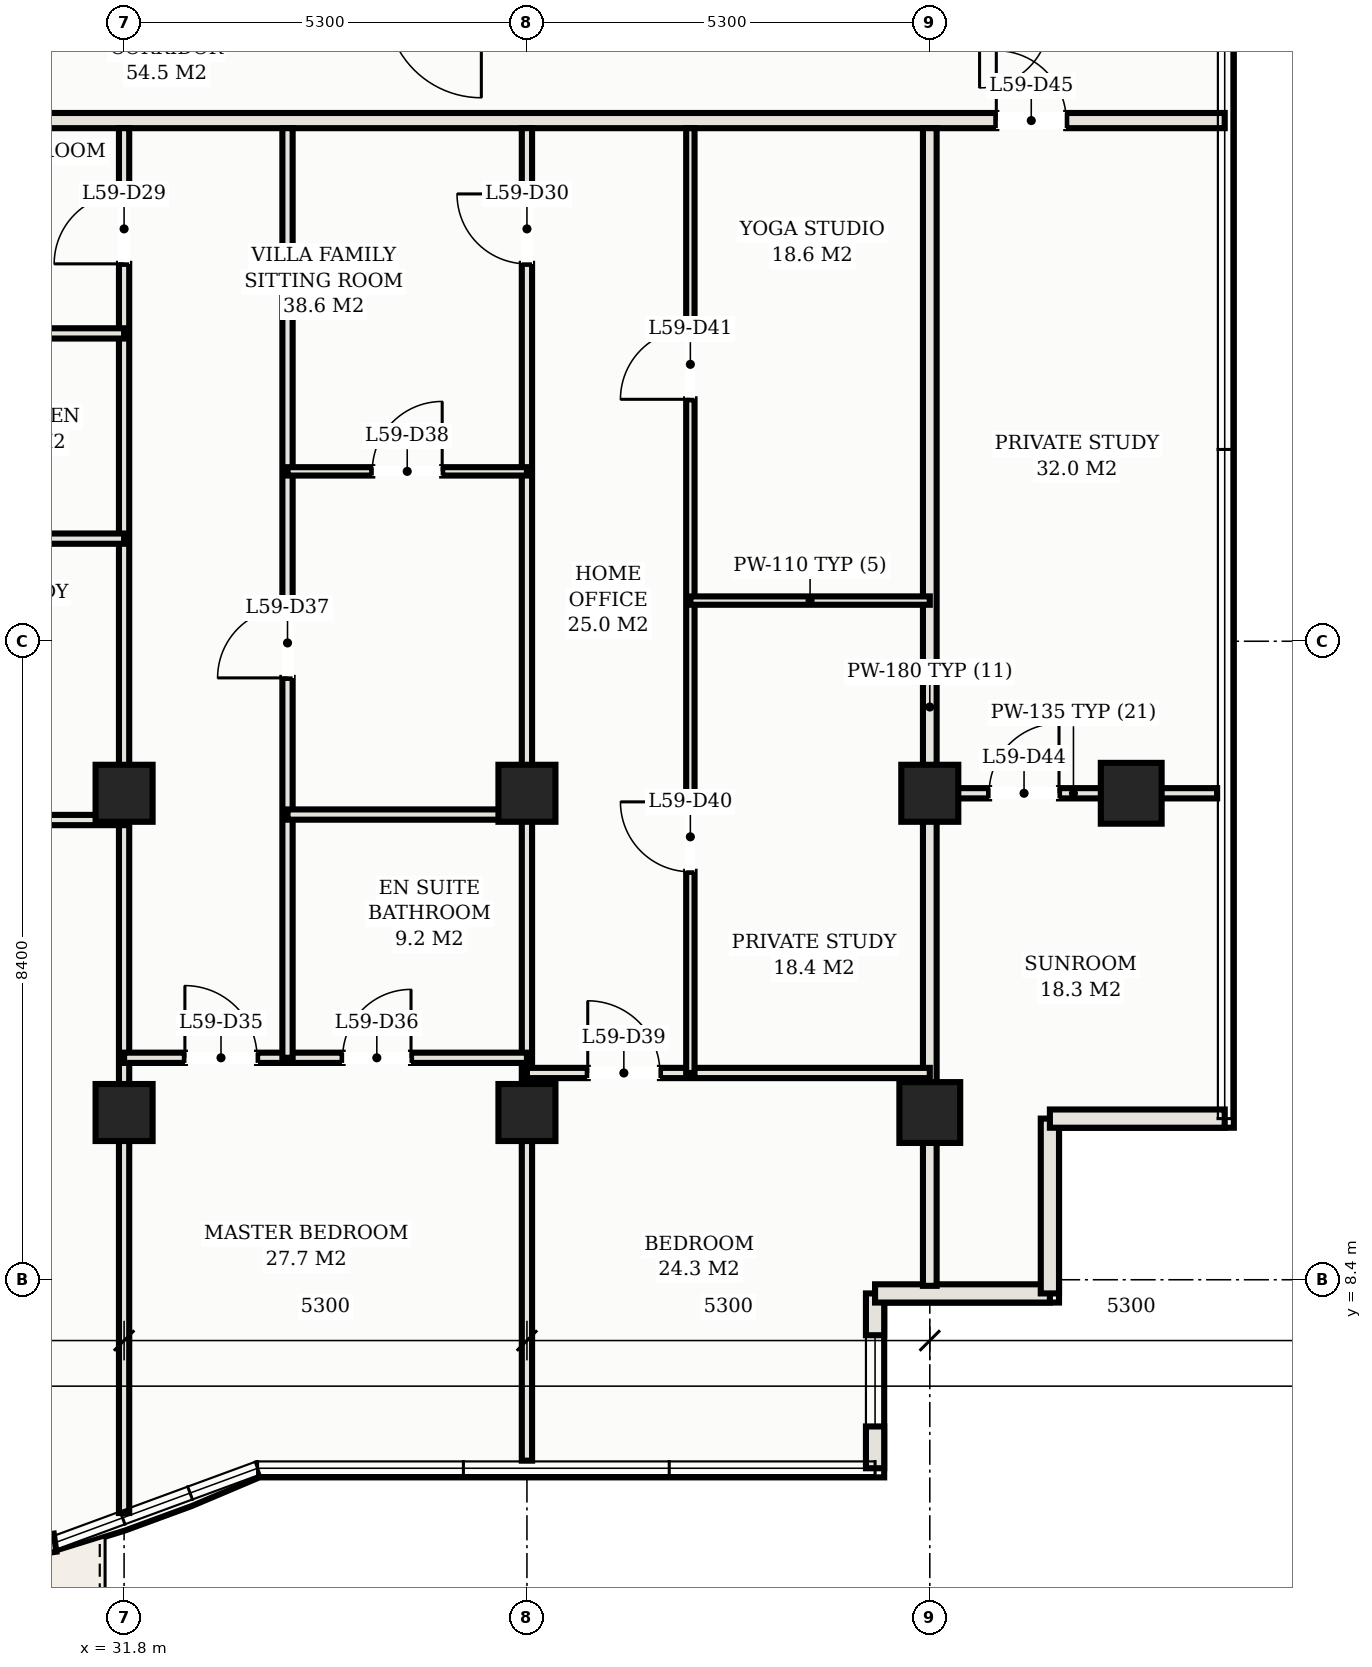
"""IFC4 building model, lengths in metres.
Left out: names, types, materials, properties, quantities, classifications, styles, units other than length and angle.
Written with IfcOpenShell. Run it as: python <this file> out.ifc"""

import sys

from ifc_helpers import new_model, si_unit, direction, frame, frame_2d, origin, origin_2d, place, context, subcontext, project, spatial, rectangle, hollow_rectangle, extrude, element, fill, save


model = new_model("IFC4")
c1 = context("Model", 3, precision=1e-05, world=origin(), true_north=direction((0.0, 1.0)))
c2 = subcontext(c1, "Body", "Model", "MODEL_VIEW")
j1 = project(units=[si_unit("LENGTHUNIT", "METRE"), si_unit("PLANEANGLEUNIT", "RADIAN")], contexts=[c1])
p1 = place(None, origin())
s1 = spatial("IfcSite", under=j1, at=p1, CompositionType="ELEMENT")
p2 = place(p1, origin())
s2 = spatial("IfcBuilding", under=s1, at=p2, CompositionType="ELEMENT")
p3 = place(p2, frame((0.0, 0.0, 216.5)))
s3 = spatial("IfcBuildingStorey", under=s2, at=p3, CompositionType="ELEMENT", Elevation=216.5)
for number, where, z_axis, x_axis in (
    (1, (31.8, 14.8, 0.0), (0.0, 0.0, 1.0), (1.0, 0.0, 0.0)),
    (2, (31.8, 10.6, 0.0), (0.0, 0.0, 1.0), (1.0, 0.0, 0.0)),
    (3, (37.1, 14.8, 0.0), (0.0, 0.0, 1.0), (1.0, 0.0, 0.0)),
    (4, (37.1, 10.6, 0.0), (0.0, 0.0, 1.0), (1.0, 0.0, 0.0)),
    (5, (42.4, 14.8, 0.0), (0.0, 0.0, 1.0), (1.0, 0.0, 0.0)),
):
    element("IfcColumn", number, at=place(p3, frame(where, z_axis=z_axis, x_axis=x_axis)), inside=s3, PredefinedType="COLUMN", context=c2, shape_type="SweptSolid", body=[
        extrude(hollow_rectangle(XDim=0.75, YDim=0.75, WallThickness=0.025, at=origin_2d()), origin(), (0.0, 0.0, 1.0), 3.3),
    ])
for number, where, z_axis, x_axis in (
    (6, (42.4, 10.6, 0.0), (0.0, 0.0, 1.0), (1.0, 0.0, 0.0)),
    (7, (45.05, 14.8, 0.0), (0.0, 0.0, 1.0), (1.0, 0.0, 0.0)),
):
    element("IfcColumn", number, at=place(p3, frame(where, z_axis=z_axis, x_axis=x_axis)), inside=s3, PredefinedType="COLUMN", context=c2, shape_type="SweptSolid", body=[
        extrude(hollow_rectangle(XDim=0.8, YDim=0.8, WallThickness=0.028, at=origin_2d()), origin(), (0.0, 0.0, 1.0), 3.3),
    ])
p4 = place(p3, frame((26.5, 4.32, 0.0), z_axis=(0.0, 0.0, 1.0), x_axis=(0.990156470874, 0.139964864115, 0.0)))
e8 = element("IfcWall", 8, at=p4, inside=s3, PredefinedType="SOLIDWALL", context=c2, shape_type="SweptSolid", body=[
    extrude(rectangle(XDim=4.436, YDim=0.24, at=frame_2d((2.218, 0.0))), origin(), (0.0, 0.0, 1.0), 3.11),
])
p5 = place(p4, frame((1.318, 0.0, 0.0)))
e9 = element("IfcOpeningElement", 9, at=p5, cuts=e8, PredefinedType="OPENING", context=c2, shape_type="SweptSolid", body=[
    extrude(rectangle(XDim=1.8, YDim=2.2, at=frame_2d((0.9, 1.1))), frame((0.0, 0.13, 0.0), z_axis=(0.0, -1.0, 0.0), x_axis=(1.0, 0.0, 0.0)), (0.0, 0.0, 1.0), 0.26),
])
p6 = place(p3, frame((41.68, 5.92, 0.0), z_axis=(0.0, 0.0, 1.0), x_axis=(0.0, 1.0, 0.0)))
e10 = element("IfcWall", 10, at=p6, inside=s3, PredefinedType="SOLIDWALL", context=c2, shape_type="SweptSolid", body=[
    extrude(rectangle(XDim=2.3, YDim=0.24, at=frame_2d((1.15, 0.0))), origin(), (0.0, 0.0, 1.0), 3.11),
])
p7 = place(p6, frame((0.55, 0.0, 0.75)))
e11 = element("IfcOpeningElement", 11, at=p7, cuts=e10, PredefinedType="OPENING", context=c2, shape_type="SweptSolid", body=[
    extrude(rectangle(XDim=1.2, YDim=1.5, at=frame_2d((0.6, 0.75))), frame((0.0, 0.13, 0.0), z_axis=(0.0, -1.0, 0.0), x_axis=(1.0, 0.0, 0.0)), (0.0, 0.0, 1.0), 0.26),
])
for number, where, z_axis, x_axis in (
    (12, (41.68, 8.22, 0.0), (0.0, 0.0, 1.0), (1.0, 0.0, 0.0)),
    (13, (43.98, 8.22, 0.0), (0.0, 0.0, 1.0), (0.0, 1.0, 0.0)),
    (14, (43.98, 10.52, 0.0), (0.0, 0.0, 1.0), (1.0, 0.0, 0.0)),
):
    element("IfcWall", number, at=place(p3, frame(where, z_axis=z_axis, x_axis=x_axis)), inside=s3, PredefinedType="SOLIDWALL", context=c2, shape_type="SweptSolid", body=[
        extrude(rectangle(XDim=2.3, YDim=0.24, at=frame_2d((1.15, 0.0))), origin(), (0.0, 0.0, 1.0), 3.11),
    ])
p8 = place(p3, frame((6.72, 23.65, 0.0), z_axis=(0.0, 0.0, 1.0), x_axis=(1.0, 0.0, 0.0)))
e15 = element("IfcWall", 15, at=p8, inside=s3, PredefinedType="PARTITIONING", context=c2, shape_type="SweptSolid", body=[
    extrude(rectangle(XDim=39.56, YDim=0.2, at=frame_2d((19.78, 0.0))), origin(), (0.0, 0.0, 1.0), 2.43),
])
p9 = place(p8, frame((4.63, 0.0, 0.0)))
e16 = element("IfcOpeningElement", 16, at=p9, cuts=e15, PredefinedType="OPENING", context=c2, shape_type="SweptSolid", body=[
    extrude(rectangle(XDim=1.1, YDim=2.25, at=frame_2d((0.55, 1.125))), frame((0.0, 0.11, 0.0), z_axis=(0.0, -1.0, 0.0), x_axis=(1.0, 0.0, 0.0)), (0.0, 0.0, 1.0), 0.22),
])
p10 = place(p8, frame((20.53, 0.0, 0.0)))
e17 = element("IfcOpeningElement", 17, at=p10, cuts=e15, PredefinedType="OPENING", context=c2, shape_type="SweptSolid", body=[
    extrude(rectangle(XDim=1.1, YDim=2.25, at=frame_2d((0.55, 1.125))), frame((0.0, 0.11, 0.0), z_axis=(0.0, -1.0, 0.0), x_axis=(1.0, 0.0, 0.0)), (0.0, 0.0, 1.0), 0.22),
])
p11 = place(p8, frame((2.085, 0.0, 0.0)))
e18 = element("IfcOpeningElement", 18, at=p11, cuts=e15, PredefinedType="OPENING", context=c2, shape_type="SweptSolid", body=[
    extrude(rectangle(XDim=0.92, YDim=2.15, at=frame_2d((0.46, 1.075))), frame((0.0, 0.11, 0.0), z_axis=(0.0, -1.0, 0.0), x_axis=(1.0, 0.0, 0.0)), (0.0, 0.0, 1.0), 0.22),
])
p12 = place(p8, frame((36.555, 0.0, 0.0)))
e19 = element("IfcOpeningElement", 19, at=p12, cuts=e15, PredefinedType="OPENING", context=c2, shape_type="SweptSolid", body=[
    extrude(rectangle(XDim=0.92, YDim=2.15, at=frame_2d((0.46, 1.075))), frame((0.0, 0.11, 0.0), z_axis=(0.0, -1.0, 0.0), x_axis=(1.0, 0.0, 0.0)), (0.0, 0.0, 1.0), 0.22),
])
p13 = place(p3, frame((42.4, 8.32, 0.0), z_axis=(0.0, 0.0, 1.0), x_axis=(0.0, 1.0, 0.0)))
e20 = element("IfcWall", 20, at=p13, inside=s3, PredefinedType="PARTITIONING", context=c2, shape_type="SweptSolid", body=[
    extrude(rectangle(XDim=15.23, YDim=0.18, at=frame_2d((7.615, 0.0))), origin(), (0.0, 0.0, 1.0), 2.43),
])
p14 = place(p3, frame((31.8, 5.331, 0.0), z_axis=(0.0, 0.0, 1.0), x_axis=(0.0, 1.0, 0.0)))
e21 = element("IfcWall", 21, at=p14, inside=s3, PredefinedType="PARTITIONING", context=c2, shape_type="SweptSolid", body=[
    extrude(rectangle(XDim=18.219, YDim=0.135, at=frame_2d((9.109, 0.0))), origin(), (0.0, 0.0, 1.0), 2.43),
])
p15 = place(p14, frame((16.434, 0.0, 0.0)))
e22 = element("IfcOpeningElement", 22, at=p15, cuts=e21, PredefinedType="OPENING", context=c2, shape_type="SweptSolid", body=[
    extrude(rectangle(XDim=0.92, YDim=2.15, at=frame_2d((0.46, 1.075))), frame((0.0, 0.078, 0.0), z_axis=(0.0, -1.0, 0.0), x_axis=(1.0, 0.0, 0.0)), (0.0, 0.0, 1.0), 0.155),
])
p16 = place(p3, frame((37.1, 6.02, 0.0), z_axis=(0.0, 0.0, 1.0), x_axis=(0.0, 1.0, 0.0)))
e23 = element("IfcWall", 23, at=p16, inside=s3, PredefinedType="PARTITIONING", context=c2, shape_type="SweptSolid", body=[
    extrude(rectangle(XDim=17.53, YDim=0.135, at=frame_2d((8.765, 0.0))), origin(), (0.0, 0.0, 1.0), 2.43),
])
p17 = place(p16, frame((15.745, 0.0, 0.0)))
e24 = element("IfcOpeningElement", 24, at=p17, cuts=e23, PredefinedType="OPENING", context=c2, shape_type="SweptSolid", body=[
    extrude(rectangle(XDim=0.92, YDim=2.15, at=frame_2d((0.46, 1.075))), frame((0.0, 0.078, 0.0), z_axis=(0.0, -1.0, 0.0), x_axis=(1.0, 0.0, 0.0)), (0.0, 0.0, 1.0), 0.155),
])
p18 = place(p3, frame((26.5, 14.448, 0.0), z_axis=(0.0, 0.0, 1.0), x_axis=(1.0, 0.0, 0.0)))
e25 = element("IfcWall", 25, at=p18, inside=s3, PredefinedType="PARTITIONING", context=c2, shape_type="SweptSolid", body=[
    extrude(rectangle(XDim=5.3, YDim=0.135, at=frame_2d((2.65, 0.0))), origin(), (0.0, 0.0, 1.0), 2.43),
])
p19 = place(p18, frame((0.815, 0.0, 0.0)))
e26 = element("IfcOpeningElement", 26, at=p19, cuts=e25, PredefinedType="OPENING", context=c2, shape_type="SweptSolid", body=[
    extrude(rectangle(XDim=0.92, YDim=2.15, at=frame_2d((0.46, 1.075))), frame((0.0, 0.078, 0.0), z_axis=(0.0, -1.0, 0.0), x_axis=(1.0, 0.0, 0.0)), (0.0, 0.0, 1.0), 0.155),
])
for number, where, z_axis, x_axis in (
    (27, (28.65, 18.15, 0.0), (0.0, 0.0, 1.0), (1.0, 0.0, 0.0)),
    (28, (28.65, 20.85, 0.0), (0.0, 0.0, 1.0), (1.0, 0.0, 0.0)),
):
    element("IfcWall", number, at=place(p3, frame(where, z_axis=z_axis, x_axis=x_axis)), inside=s3, PredefinedType="PARTITIONING", context=c2, shape_type="SweptSolid", body=[
        extrude(rectangle(XDim=3.15, YDim=0.135, at=frame_2d((1.575, 0.0))), origin(), (0.0, 0.0, 1.0), 2.43),
    ])
p20 = place(p3, frame((31.8, 11.32, 0.0), z_axis=(0.0, 0.0, 1.0), x_axis=(1.0, 0.0, 0.0)))
e29 = element("IfcWall", 29, at=p20, inside=s3, PredefinedType="PARTITIONING", context=c2, shape_type="SweptSolid", body=[
    extrude(rectangle(XDim=5.3, YDim=0.135, at=frame_2d((2.65, 0.0))), origin(), (0.0, 0.0, 1.0), 2.43),
])
p21 = place(p20, frame((0.8, 0.0, 0.0)))
e30 = element("IfcOpeningElement", 30, at=p21, cuts=e29, PredefinedType="OPENING", context=c2, shape_type="SweptSolid", body=[
    extrude(rectangle(XDim=0.95, YDim=2.15, at=frame_2d((0.475, 1.075))), frame((0.0, 0.078, 0.0), z_axis=(0.0, -1.0, 0.0), x_axis=(1.0, 0.0, 0.0)), (0.0, 0.0, 1.0), 0.155),
])
p22 = place(p20, frame((2.875, 0.0, 0.0)))
e31 = element("IfcOpeningElement", 31, at=p22, cuts=e29, PredefinedType="OPENING", context=c2, shape_type="SweptSolid", body=[
    extrude(rectangle(XDim=0.9, YDim=2.15, at=frame_2d((0.45, 1.075))), frame((0.0, 0.078, 0.0), z_axis=(0.0, -1.0, 0.0), x_axis=(1.0, 0.0, 0.0)), (0.0, 0.0, 1.0), 0.155),
])
p23 = place(p3, frame((33.95, 11.32, 0.0), z_axis=(0.0, 0.0, 1.0), x_axis=(0.0, 1.0, 0.0)))
e32 = element("IfcWall", 32, at=p23, inside=s3, PredefinedType="PARTITIONING", context=c2, shape_type="SweptSolid", body=[
    extrude(rectangle(XDim=12.23, YDim=0.135, at=frame_2d((6.115, 0.0))), origin(), (0.0, 0.0, 1.0), 2.43),
])
p24 = place(p23, frame((4.998, 0.0, 0.0)))
e33 = element("IfcOpeningElement", 33, at=p24, cuts=e32, PredefinedType="OPENING", context=c2, shape_type="SweptSolid", body=[
    extrude(rectangle(XDim=0.92, YDim=2.15, at=frame_2d((0.46, 1.075))), frame((0.0, 0.078, 0.0), z_axis=(0.0, -1.0, 0.0), x_axis=(1.0, 0.0, 0.0)), (0.0, 0.0, 1.0), 0.155),
])
p25 = place(p3, frame((33.95, 14.52, 0.0), z_axis=(0.0, 0.0, 1.0), x_axis=(1.0, 0.0, 0.0)))
e34 = element("IfcWall", 34, at=p25, inside=s3, PredefinedType="PARTITIONING", context=c2, shape_type="SweptSolid", body=[
    extrude(rectangle(XDim=3.15, YDim=0.135, at=frame_2d((1.575, 0.0))), origin(), (0.0, 0.0, 1.0), 2.43),
])
p26 = place(p3, frame((33.95, 19.035, 0.0), z_axis=(0.0, 0.0, 1.0), x_axis=(1.0, 0.0, 0.0)))
e35 = element("IfcWall", 35, at=p26, inside=s3, PredefinedType="MOVABLE", context=c2, shape_type="SweptSolid", body=[
    extrude(rectangle(XDim=3.15, YDim=0.11, at=frame_2d((1.575, 0.0))), origin(), (0.0, 0.0, 1.0), 2.43),
])
p27 = place(p26, frame((1.115, 0.0, 0.0)))
e36 = element("IfcOpeningElement", 36, at=p27, cuts=e35, PredefinedType="OPENING", context=c2, shape_type="SweptSolid", body=[
    extrude(rectangle(XDim=0.92, YDim=2.15, at=frame_2d((0.46, 1.075))), frame((0.0, 0.065, 0.0), z_axis=(0.0, -1.0, 0.0), x_axis=(1.0, 0.0, 0.0)), (0.0, 0.0, 1.0), 0.13),
])
p28 = place(p3, frame((37.1, 11.12, 0.0), z_axis=(0.0, 0.0, 1.0), x_axis=(1.0, 0.0, 0.0)))
e37 = element("IfcWall", 37, at=p28, inside=s3, PredefinedType="PARTITIONING", context=c2, shape_type="SweptSolid", body=[
    extrude(rectangle(XDim=5.3, YDim=0.135, at=frame_2d((2.65, 0.0))), origin(), (0.0, 0.0, 1.0), 2.43),
])
p29 = place(p28, frame((0.8, 0.0, 0.0)))
e38 = element("IfcOpeningElement", 38, at=p29, cuts=e37, PredefinedType="OPENING", context=c2, shape_type="SweptSolid", body=[
    extrude(rectangle(XDim=0.95, YDim=2.15, at=frame_2d((0.475, 1.075))), frame((0.0, 0.078, 0.0), z_axis=(0.0, -1.0, 0.0), x_axis=(1.0, 0.0, 0.0)), (0.0, 0.0, 1.0), 0.155),
])
p30 = place(p3, frame((39.25, 11.12, 0.0), z_axis=(0.0, 0.0, 1.0), x_axis=(0.0, 1.0, 0.0)))
e39 = element("IfcWall", 39, at=p30, inside=s3, PredefinedType="MOVABLE", context=c2, shape_type="SweptSolid", body=[
    extrude(rectangle(XDim=12.43, YDim=0.11, at=frame_2d((6.215, 0.0))), origin(), (0.0, 0.0, 1.0), 2.43),
])
p31 = place(p30, frame((2.647, 0.0, 0.0)))
e40 = element("IfcOpeningElement", 40, at=p31, cuts=e39, PredefinedType="OPENING", context=c2, shape_type="SweptSolid", body=[
    extrude(rectangle(XDim=0.92, YDim=2.15, at=frame_2d((0.46, 1.075))), frame((0.0, 0.065, 0.0), z_axis=(0.0, -1.0, 0.0), x_axis=(1.0, 0.0, 0.0)), (0.0, 0.0, 1.0), 0.13),
])
p32 = place(p30, frame((8.863, 0.0, 0.0)))
e41 = element("IfcOpeningElement", 41, at=p32, cuts=e39, PredefinedType="OPENING", context=c2, shape_type="SweptSolid", body=[
    extrude(rectangle(XDim=0.92, YDim=2.15, at=frame_2d((0.46, 1.075))), frame((0.0, 0.065, 0.0), z_axis=(0.0, -1.0, 0.0), x_axis=(1.0, 0.0, 0.0)), (0.0, 0.0, 1.0), 0.13),
])
p33 = place(p3, frame((39.25, 17.335, 0.0), z_axis=(0.0, 0.0, 1.0), x_axis=(1.0, 0.0, 0.0)))
e42 = element("IfcWall", 42, at=p33, inside=s3, PredefinedType="MOVABLE", context=c2, shape_type="SweptSolid", body=[
    extrude(rectangle(XDim=3.15, YDim=0.11, at=frame_2d((1.575, 0.0))), origin(), (0.0, 0.0, 1.0), 2.43),
])
p34 = place(p3, frame((42.4, 14.8, 0.0), z_axis=(0.0, 0.0, 1.0), x_axis=(1.0, 0.0, 0.0)))
e43 = element("IfcWall", 43, at=p34, inside=s3, PredefinedType="PARTITIONING", context=c2, shape_type="SweptSolid", body=[
    extrude(rectangle(XDim=3.78, YDim=0.135, at=frame_2d((1.89, 0.0))), origin(), (0.0, 0.0, 1.0), 2.43),
])
p35 = place(p34, frame((0.78, 0.0, 0.0)))
e44 = element("IfcOpeningElement", 44, at=p35, cuts=e43, PredefinedType="OPENING", context=c2, shape_type="SweptSolid", body=[
    extrude(rectangle(XDim=0.92, YDim=2.15, at=frame_2d((0.46, 1.075))), frame((0.0, 0.078, 0.0), z_axis=(0.0, -1.0, 0.0), x_axis=(1.0, 0.0, 0.0)), (0.0, 0.0, 1.0), 0.155),
])
p36 = place(p7, origin())
e45 = element("IfcWindow", 45, at=p36, inside=s3, PartitioningType="SINGLE_PANEL", PredefinedType="WINDOW", context=c2, shape_type="SweptSolid", body=[
    extrude(rectangle(XDim=1.2, YDim=1.5, at=frame_2d((0.6, 0.75))), frame((0.0, 0.03, 0.0), z_axis=(0.0, -1.0, 0.0), x_axis=(1.0, 0.0, 0.0)), (0.0, 0.0, 1.0), 0.06),
])
fill(e11, e45)
p37 = place(p15, origin())
e46 = element("IfcDoor", 46, at=p37, inside=s3, OperationType="SINGLE_SWING_LEFT", PredefinedType="DOOR", context=c2, shape_type="SweptSolid", body=[
    extrude(rectangle(XDim=0.92, YDim=2.15, at=frame_2d((0.46, 1.075))), frame((0.0, 0.025, 0.0), z_axis=(0.0, -1.0, 0.0), x_axis=(1.0, 0.0, 0.0)), (0.0, 0.0, 1.0), 0.05),
])
fill(e22, e46)
p38 = place(p17, origin())
e47 = element("IfcDoor", 47, at=p38, inside=s3, OperationType="SINGLE_SWING_RIGHT", PredefinedType="DOOR", context=c2, shape_type="SweptSolid", body=[
    extrude(rectangle(XDim=0.92, YDim=2.15, at=frame_2d((0.46, 1.075))), frame((0.0, 0.025, 0.0), z_axis=(0.0, -1.0, 0.0), x_axis=(1.0, 0.0, 0.0)), (0.0, 0.0, 1.0), 0.05),
])
fill(e24, e47)
p39 = place(p21, origin())
e48 = element("IfcDoor", 48, at=p39, inside=s3, OperationType="SINGLE_SWING_LEFT", PredefinedType="DOOR", context=c2, shape_type="SweptSolid", body=[
    extrude(rectangle(XDim=0.95, YDim=2.15, at=frame_2d((0.475, 1.075))), frame((0.0, 0.025, 0.0), z_axis=(0.0, -1.0, 0.0), x_axis=(1.0, 0.0, 0.0)), (0.0, 0.0, 1.0), 0.05),
])
fill(e30, e48)
p40 = place(p22, origin())
e49 = element("IfcDoor", 49, at=p40, inside=s3, OperationType="SINGLE_SWING_RIGHT", PredefinedType="DOOR", context=c2, shape_type="SweptSolid", body=[
    extrude(rectangle(XDim=0.9, YDim=2.15, at=frame_2d((0.45, 1.075))), frame((0.0, 0.025, 0.0), z_axis=(0.0, -1.0, 0.0), x_axis=(1.0, 0.0, 0.0)), (0.0, 0.0, 1.0), 0.05),
])
fill(e31, e49)
p41 = place(p24, origin())
e50 = element("IfcDoor", 50, at=p41, inside=s3, OperationType="SINGLE_SWING_LEFT", PredefinedType="DOOR", context=c2, shape_type="SweptSolid", body=[
    extrude(rectangle(XDim=0.92, YDim=2.15, at=frame_2d((0.46, 1.075))), frame((0.0, 0.025, 0.0), z_axis=(0.0, -1.0, 0.0), x_axis=(1.0, 0.0, 0.0)), (0.0, 0.0, 1.0), 0.05),
])
fill(e33, e50)
p42 = place(p27, origin())
e51 = element("IfcDoor", 51, at=p42, inside=s3, OperationType="SINGLE_SWING_RIGHT", PredefinedType="DOOR", context=c2, shape_type="SweptSolid", body=[
    extrude(rectangle(XDim=0.92, YDim=2.15, at=frame_2d((0.46, 1.075))), frame((0.0, 0.025, 0.0), z_axis=(0.0, -1.0, 0.0), x_axis=(1.0, 0.0, 0.0)), (0.0, 0.0, 1.0), 0.05),
])
fill(e36, e51)
p43 = place(p29, origin())
e52 = element("IfcDoor", 52, at=p43, inside=s3, OperationType="SINGLE_SWING_LEFT", PredefinedType="DOOR", context=c2, shape_type="SweptSolid", body=[
    extrude(rectangle(XDim=0.95, YDim=2.15, at=frame_2d((0.475, 1.075))), frame((0.0, 0.025, 0.0), z_axis=(0.0, -1.0, 0.0), x_axis=(1.0, 0.0, 0.0)), (0.0, 0.0, 1.0), 0.05),
])
fill(e38, e52)
p44 = place(p31, origin())
e53 = element("IfcDoor", 53, at=p44, inside=s3, OperationType="SINGLE_SWING_RIGHT", PredefinedType="DOOR", context=c2, shape_type="SweptSolid", body=[
    extrude(rectangle(XDim=0.92, YDim=2.15, at=frame_2d((0.46, 1.075))), frame((0.0, 0.025, 0.0), z_axis=(0.0, -1.0, 0.0), x_axis=(1.0, 0.0, 0.0)), (0.0, 0.0, 1.0), 0.05),
])
fill(e40, e53)
p45 = place(p32, origin())
e54 = element("IfcDoor", 54, at=p45, inside=s3, OperationType="SINGLE_SWING_LEFT", PredefinedType="DOOR", context=c2, shape_type="SweptSolid", body=[
    extrude(rectangle(XDim=0.92, YDim=2.15, at=frame_2d((0.46, 1.075))), frame((0.0, 0.025, 0.0), z_axis=(0.0, -1.0, 0.0), x_axis=(1.0, 0.0, 0.0)), (0.0, 0.0, 1.0), 0.05),
])
fill(e41, e54)
p46 = place(p35, origin())
e55 = element("IfcDoor", 55, at=p46, inside=s3, OperationType="SINGLE_SWING_RIGHT", PredefinedType="DOOR", context=c2, shape_type="SweptSolid", body=[
    extrude(rectangle(XDim=0.92, YDim=2.15, at=frame_2d((0.46, 1.075))), frame((0.0, 0.025, 0.0), z_axis=(0.0, -1.0, 0.0), x_axis=(1.0, 0.0, 0.0)), (0.0, 0.0, 1.0), 0.05),
])
fill(e44, e55)
p47 = place(p12, origin())
e56 = element("IfcDoor", 56, at=p47, inside=s3, OperationType="SINGLE_SWING_LEFT", PredefinedType="DOOR", context=c2, shape_type="SweptSolid", body=[
    extrude(rectangle(XDim=0.92, YDim=2.15, at=frame_2d((0.46, 1.075))), frame((0.0, 0.025, 0.0), z_axis=(0.0, -1.0, 0.0), x_axis=(1.0, 0.0, 0.0)), (0.0, 0.0, 1.0), 0.05),
])
fill(e19, e56)
save(model, sys.argv[1])
